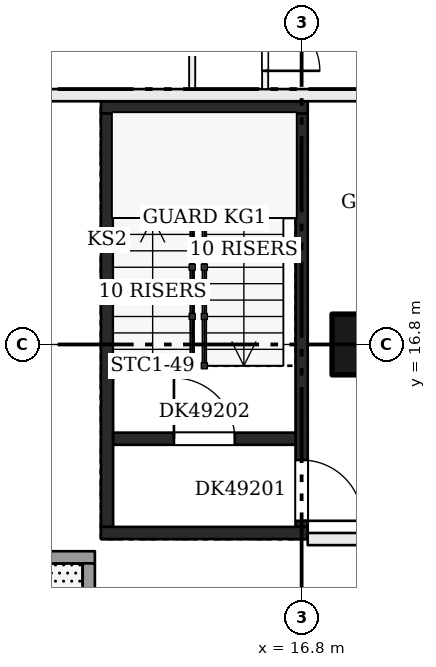
"""IFC4 building model, lengths in metres.
Left out: names, types, materials, properties, quantities, classifications, styles, units other than length and angle.
Written with IfcOpenShell. Run it as: python <this file> out.ifc"""

import sys

from ifc_helpers import new_model, si_unit, direction, frame, frame_2d, origin, origin_2d, place, context, subcontext, project, spatial, rectangle, extrude, element, fill, save


model = new_model("IFC4")
c1 = context("Model", 3, precision=1e-05, world=origin(), true_north=direction((0.0, 1.0)))
c2 = subcontext(c1, "Body", "Model", "MODEL_VIEW")
j1 = project(units=[si_unit("LENGTHUNIT", "METRE"), si_unit("PLANEANGLEUNIT", "RADIAN")], contexts=[c1])
p1 = place(None, origin())
s1 = spatial("IfcSite", under=j1, at=p1, CompositionType="ELEMENT")
p2 = place(p1, origin())
s2 = spatial("IfcBuilding", under=s1, at=p2, CompositionType="ELEMENT")
p3 = place(p2, frame((0.0, 0.0, 189.7)))
s3 = spatial("IfcBuildingStorey", under=s2, at=p3, CompositionType="ELEMENT", Elevation=189.7)
p4 = place(p3, frame((17.8, 16.8, 0.0), z_axis=(0.0, 0.0, 1.0), x_axis=(1.0, 0.0, 0.0)))
e1 = element("IfcColumn", 1, at=p4, inside=s3, PredefinedType="COLUMN", context=c2, shape_type="SweptSolid", body=[
    extrude(rectangle(XDim=1.0, YDim=1.0, at=origin_2d()), origin(), (0.0, 0.0, 1.0), 3.22),
])
p5 = place(p3, frame((13.6, 13.8, 0.0), z_axis=(0.0, 0.0, 1.0), x_axis=(0.0, 1.0, 0.0)))
e2 = element("IfcWall", 2, at=p5, inside=s3, PredefinedType="SHEAR", context=c2, shape_type="SweptSolid", body=[
    extrude(rectangle(XDim=6.8, YDim=0.2, at=frame_2d((3.4, 0.0))), origin(), (0.0, 0.0, 1.0), 3.22),
])
p6 = place(p3, frame((16.8, 13.8, 0.0), z_axis=(0.0, 0.0, 1.0), x_axis=(0.0, 1.0, 0.0)))
e3 = element("IfcWall", 3, at=p6, inside=s3, PredefinedType="SHEAR", context=c2, shape_type="SweptSolid", body=[
    extrude(rectangle(XDim=6.8, YDim=0.2, at=frame_2d((3.4, 0.0))), origin(), (0.0, 0.0, 1.0), 3.22),
])
p7 = place(p6, frame((0.1, 0.0, 0.0)))
e4 = element("IfcOpeningElement", 4, at=p7, cuts=e3, PredefinedType="OPENING", context=c2, shape_type="SweptSolid", body=[
    extrude(rectangle(XDim=1.0, YDim=2.1, at=frame_2d((0.5, 1.05))), frame((0.0, 0.11, 0.0), z_axis=(0.0, -1.0, 0.0), x_axis=(1.0, 0.0, 0.0)), (0.0, 0.0, 1.0), 0.22),
])
for number, where, z_axis, x_axis in (
    (5, (13.5, 13.7, 0.0), (0.0, 0.0, 1.0), (1.0, 0.0, 0.0)),
    (6, (13.5, 20.7, 0.0), (0.0, 0.0, 1.0), (1.0, 0.0, 0.0)),
):
    element("IfcWall", number, at=place(p3, frame(where, z_axis=z_axis, x_axis=x_axis)), inside=s3, PredefinedType="SHEAR", context=c2, shape_type="SweptSolid", body=[
        extrude(rectangle(XDim=3.4, YDim=0.2, at=frame_2d((1.7, 0.0))), origin(), (0.0, 0.0, 1.0), 3.22),
    ])
p8 = place(p3, frame((13.7, 15.25, 0.0), z_axis=(0.0, 0.0, 1.0), x_axis=(1.0, 0.0, 0.0)))
e7 = element("IfcWall", 7, at=p8, inside=s3, PredefinedType="SHEAR", context=c2, shape_type="SweptSolid", body=[
    extrude(rectangle(XDim=3.0, YDim=0.2, at=frame_2d((1.5, 0.0))), origin(), (0.0, 0.0, 1.0), 3.22),
])
p9 = place(p8, frame((1.0, 0.0, 0.0)))
e8 = element("IfcOpeningElement", 8, at=p9, cuts=e7, PredefinedType="OPENING", context=c2, shape_type="SweptSolid", body=[
    extrude(rectangle(XDim=1.0, YDim=2.1, at=frame_2d((0.5, 1.05))), frame((0.0, 0.11, 0.0), z_axis=(0.0, -1.0, 0.0), x_axis=(1.0, 0.0, 0.0)), (0.0, 0.0, 1.0), 0.22),
])
p10 = place(p3, frame((16.9, 13.6, 0.0), z_axis=(0.0, 0.0, 1.0), x_axis=(1.0, 0.0, 0.0)))
e9 = element("IfcWall", 9, at=p10, inside=s3, PredefinedType="PARTITIONING", context=c2, shape_type="SweptSolid", body=[
    extrude(rectangle(XDim=4.2, YDim=0.2, at=frame_2d((2.1, 0.0))), origin(), (0.0, 0.0, 1.0), 3.22),
])
p11 = place(p10, frame((1.6, 0.0, 0.0)))
e10 = element("IfcOpeningElement", 10, at=p11, cuts=e9, PredefinedType="OPENING", context=c2, shape_type="SweptSolid", body=[
    extrude(rectangle(XDim=1.0, YDim=2.1, at=frame_2d((0.5, 1.05))), frame((0.0, 0.11, 0.0), z_axis=(0.0, -1.0, 0.0), x_axis=(1.0, 0.0, 0.0)), (0.0, 0.0, 1.0), 0.22),
])
p12 = place(p3, frame((10.9, 20.9, 0.0), z_axis=(0.0, 0.0, 1.0), x_axis=(1.0, 0.0, 0.0)))
e11 = element("IfcWall", 11, at=p12, inside=s3, PredefinedType="PARTITIONING", context=c2, shape_type="SweptSolid", body=[
    extrude(rectangle(XDim=8.3, YDim=0.2, at=frame_2d((4.15, 0.0))), origin(), (0.0, 0.0, 1.0), 3.22),
])
p13 = place(p3, frame((15.0, 21.0, 0.0), z_axis=(0.0, 0.0, 1.0), x_axis=(0.0, 1.0, 0.0)))
e12 = element("IfcWall", 12, at=p13, inside=s3, PredefinedType="PARTITIONING", context=c2, shape_type="SweptSolid", body=[
    extrude(rectangle(XDim=19.0, YDim=0.1, at=frame_2d((9.5, 0.0))), origin(), (0.0, 0.0, 1.0), 3.22),
])
p14 = place(p13, frame((5.8, 0.0, 0.0)))
e13 = element("IfcOpeningElement", 13, at=p14, cuts=e12, PredefinedType="OPENING", context=c2, shape_type="SweptSolid", body=[
    extrude(rectangle(XDim=0.9, YDim=2.1, at=frame_2d((0.45, 1.05))), frame((0.0, 0.06, 0.0), z_axis=(0.0, -1.0, 0.0), x_axis=(1.0, 0.0, 0.0)), (0.0, 0.0, 1.0), 0.12),
])
p15 = place(p13, frame((15.4, 0.0, 0.0)))
e14 = element("IfcOpeningElement", 14, at=p15, cuts=e12, PredefinedType="OPENING", context=c2, shape_type="SweptSolid", body=[
    extrude(rectangle(XDim=0.9, YDim=2.1, at=frame_2d((0.45, 1.05))), frame((0.0, 0.06, 0.0), z_axis=(0.0, -1.0, 0.0), x_axis=(1.0, 0.0, 0.0)), (0.0, 0.0, 1.0), 0.12),
])
p16 = place(p3, frame((16.2, 21.0, 0.0), z_axis=(0.0, 0.0, 1.0), x_axis=(0.0, 1.0, 0.0)))
e15 = element("IfcWall", 15, at=p16, inside=s3, PredefinedType="PARTITIONING", context=c2, shape_type="SweptSolid", body=[
    extrude(rectangle(XDim=19.0, YDim=0.1, at=frame_2d((9.5, 0.0))), origin(), (0.0, 0.0, 1.0), 3.22),
])
p17 = place(p16, frame((2.6, 0.0, 0.0)))
e16 = element("IfcOpeningElement", 16, at=p17, cuts=e15, PredefinedType="OPENING", context=c2, shape_type="SweptSolid", body=[
    extrude(rectangle(XDim=0.9, YDim=2.1, at=frame_2d((0.45, 1.05))), frame((0.0, 0.06, 0.0), z_axis=(0.0, -1.0, 0.0), x_axis=(1.0, 0.0, 0.0)), (0.0, 0.0, 1.0), 0.12),
])
p18 = place(p16, frame((0.3, 0.0, 0.0)))
e17 = element("IfcOpeningElement", 17, at=p18, cuts=e15, PredefinedType="OPENING", context=c2, shape_type="SweptSolid", body=[
    extrude(rectangle(XDim=0.9, YDim=2.1, at=frame_2d((0.45, 1.05))), frame((0.0, 0.06, 0.0), z_axis=(0.0, -1.0, 0.0), x_axis=(1.0, 0.0, 0.0)), (0.0, 0.0, 1.0), 0.12),
])
p19 = place(p16, frame((6.32, 0.0, 0.0)))
e18 = element("IfcOpeningElement", 18, at=p19, cuts=e15, PredefinedType="OPENING", context=c2, shape_type="SweptSolid", body=[
    extrude(rectangle(XDim=0.9, YDim=2.1, at=frame_2d((0.45, 1.05))), frame((0.0, 0.06, 0.0), z_axis=(0.0, -1.0, 0.0), x_axis=(1.0, 0.0, 0.0)), (0.0, 0.0, 1.0), 0.12),
])
p20 = place(p16, frame((10.14, 0.0, 0.0)))
e19 = element("IfcOpeningElement", 19, at=p20, cuts=e15, PredefinedType="OPENING", context=c2, shape_type="SweptSolid", body=[
    extrude(rectangle(XDim=0.9, YDim=2.1, at=frame_2d((0.45, 1.05))), frame((0.0, 0.06, 0.0), z_axis=(0.0, -1.0, 0.0), x_axis=(1.0, 0.0, 0.0)), (0.0, 0.0, 1.0), 0.12),
])
p21 = place(p16, frame((13.96, 0.0, 0.0)))
e20 = element("IfcOpeningElement", 20, at=p21, cuts=e15, PredefinedType="OPENING", context=c2, shape_type="SweptSolid", body=[
    extrude(rectangle(XDim=0.9, YDim=2.1, at=frame_2d((0.45, 1.05))), frame((0.0, 0.06, 0.0), z_axis=(0.0, -1.0, 0.0), x_axis=(1.0, 0.0, 0.0)), (0.0, 0.0, 1.0), 0.12),
])
p22 = place(p16, frame((17.18, 0.0, 0.0)))
e21 = element("IfcOpeningElement", 21, at=p22, cuts=e15, PredefinedType="OPENING", context=c2, shape_type="SweptSolid", body=[
    extrude(rectangle(XDim=0.9, YDim=2.1, at=frame_2d((0.45, 1.05))), frame((0.0, 0.06, 0.0), z_axis=(0.0, -1.0, 0.0), x_axis=(1.0, 0.0, 0.0)), (0.0, 0.0, 1.0), 0.12),
])
p23 = place(p3, frame((10.8, 13.3, 0.0), z_axis=(0.0, 0.0, 1.0), x_axis=(1.0, 0.0, 0.0)))
e22 = element("IfcWall", 22, at=p23, inside=s3, PredefinedType="SOLIDWALL", context=c2, shape_type="SweptSolid", body=[
    extrude(rectangle(XDim=2.6, YDim=0.2, at=frame_2d((1.3, 0.0))), origin(), (0.0, 0.0, 1.0), 3.22),
])
p24 = place(p3, frame((13.3, 13.2, 0.0), z_axis=(0.0, 0.0, 1.0), x_axis=(0.0, -1.0, 0.0)))
e23 = element("IfcWall", 23, at=p24, inside=s3, PredefinedType="SOLIDWALL", context=c2, shape_type="SweptSolid", body=[
    extrude(rectangle(XDim=2.2, YDim=0.2, at=frame_2d((1.1, 0.0))), origin(), (0.0, 0.0, 1.0), 3.22),
])
p25 = place(p7, frame((1.0, 0.0, 0.0), z_axis=(0.0, 0.0, 1.0), x_axis=(-1.0, 0.0, 0.0)))
e24 = element("IfcDoor", 24, at=p25, inside=s3, OperationType="SINGLE_SWING_RIGHT", PredefinedType="DOOR", context=c2, shape_type="SweptSolid", body=[
    extrude(rectangle(XDim=1.0, YDim=2.1, at=frame_2d((0.5, 1.05))), frame((0.0, 0.025, 0.0), z_axis=(0.0, -1.0, 0.0), x_axis=(1.0, 0.0, 0.0)), (0.0, 0.0, 1.0), 0.05),
])
fill(e4, e24)
p26 = place(p9, origin())
e25 = element("IfcDoor", 25, at=p26, inside=s3, OperationType="SINGLE_SWING_LEFT", PredefinedType="DOOR", context=c2, shape_type="SweptSolid", body=[
    extrude(rectangle(XDim=1.0, YDim=2.1, at=frame_2d((0.5, 1.05))), frame((0.0, 0.025, 0.0), z_axis=(0.0, -1.0, 0.0), x_axis=(1.0, 0.0, 0.0)), (0.0, 0.0, 1.0), 0.05),
])
fill(e8, e25)
p27 = place(p18, frame((0.9, 0.0, 0.0), z_axis=(0.0, 0.0, 1.0), x_axis=(-1.0, 0.0, 0.0)))
e26 = element("IfcDoor", 26, at=p27, inside=s3, OperationType="SINGLE_SWING_RIGHT", PredefinedType="DOOR", context=c2, shape_type="SweptSolid", body=[
    extrude(rectangle(XDim=0.9, YDim=2.1, at=frame_2d((0.45, 1.05))), frame((0.0, 0.025, 0.0), z_axis=(0.0, -1.0, 0.0), x_axis=(1.0, 0.0, 0.0)), (0.0, 0.0, 1.0), 0.05),
])
fill(e17, e26)
save(model, sys.argv[1])
